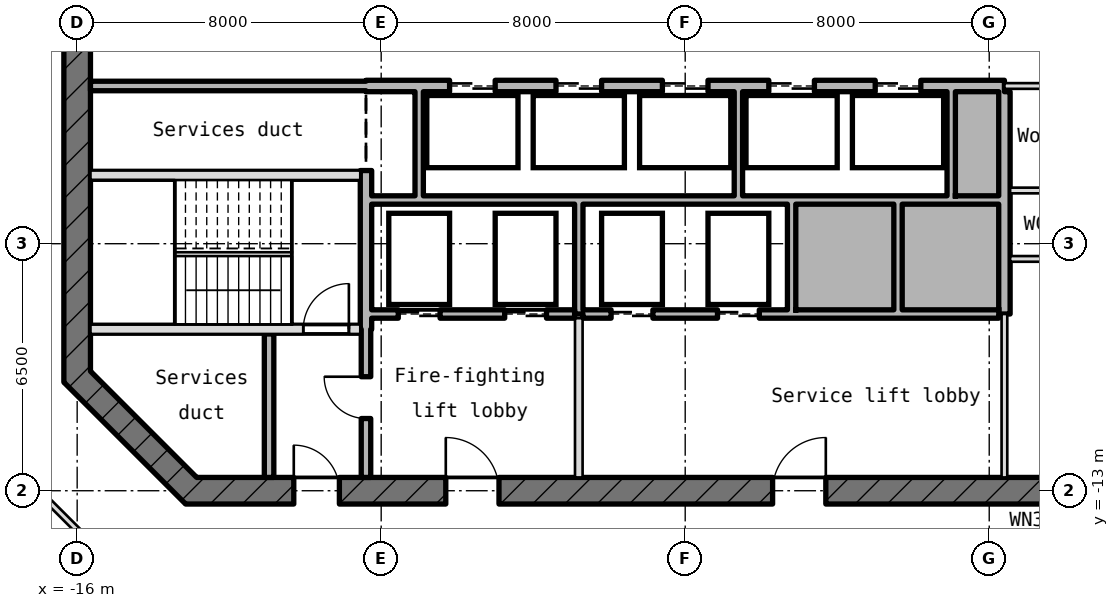
"""IFC4 building model, lengths in metres.
Left out: names, types, materials, properties, quantities, classifications, styles, units other than length and angle.
Written with IfcOpenShell. Run it as: python <this file> out.ifc"""

import sys

from ifc_helpers import new_model, si_unit, direction, frame, frame_2d, origin, place, context, subcontext, project, spatial, rectangle, extrude, element, fill, save


model = new_model("IFC4")
c1 = context("Model", 3, precision=1e-05, world=origin(), true_north=direction((0.0, 1.0)))
c2 = subcontext(c1, "Body", "Model", "MODEL_VIEW")
j1 = project(units=[si_unit("LENGTHUNIT", "METRE"), si_unit("PLANEANGLEUNIT", "RADIAN")], contexts=[c1])
p1 = place(None, origin())
s1 = spatial("IfcSite", under=j1, at=p1, CompositionType="ELEMENT")
p2 = place(p1, origin())
s2 = spatial("IfcBuilding", under=s1, at=p2, CompositionType="ELEMENT")
p3 = place(p2, frame((0.0, 0.0, 284.5)))
s3 = spatial("IfcBuildingStorey", under=s2, at=p3, CompositionType="ELEMENT", Elevation=284.5)
p4 = place(p3, frame((-16.0, 10.145, -0.18), z_axis=(0.0, 0.0, 1.0), x_axis=(0.0, -1.0, 0.0)))
e1 = element("IfcWall", 1, at=p4, inside=s3, PredefinedType="SHEAR", context=c2, shape_type="SweptSolid", body=[
    extrude(rectangle(XDim=20.29, YDim=0.7, at=frame_2d((10.145, 0.0))), origin(), (0.0, 0.0, 1.0), 4.15),
])
p5 = place(p4, frame((8.945, 0.0, 0.18)))
e2 = element("IfcOpeningElement", 2, at=p5, cuts=e1, PredefinedType="OPENING", context=c2, shape_type="SweptSolid", body=[
    extrude(rectangle(XDim=2.4, YDim=2.1, at=frame_2d((1.2, 1.05))), frame((0.0, 0.36, 0.0), z_axis=(0.0, -1.0, 0.0), x_axis=(1.0, 0.0, 0.0)), (0.0, 0.0, 1.0), 0.72),
])
p6 = place(p4, frame((5.545, 0.0, 0.18)))
e3 = element("IfcOpeningElement", 3, at=p6, cuts=e1, PredefinedType="OPENING", context=c2, shape_type="SweptSolid", body=[
    extrude(rectangle(XDim=1.2, YDim=2.1, at=frame_2d((0.6, 1.05))), frame((0.0, 0.36, 0.0), z_axis=(0.0, -1.0, 0.0), x_axis=(1.0, 0.0, 0.0)), (0.0, 0.0, 1.0), 0.72),
])
p7 = place(p3, frame((-16.103, -9.897, -0.18), z_axis=(0.0, 0.0, 1.0), x_axis=(0.707106781187, -0.707106781187, 0.0)))
e4 = element("IfcWall", 4, at=p7, inside=s3, PredefinedType="SHEAR", context=c2, shape_type="SweptSolid", body=[
    extrude(rectangle(XDim=4.533, YDim=0.7, at=frame_2d((2.266, 0.0))), origin(), (0.0, 0.0, 1.0), 4.15),
])
p8 = place(p3, frame((-13.145, -13.0, -0.18), z_axis=(0.0, 0.0, 1.0), x_axis=(1.0, 0.0, 0.0)))
e5 = element("IfcWall", 5, at=p8, inside=s3, PredefinedType="SHEAR", context=c2, shape_type="SweptSolid", body=[
    extrude(rectangle(XDim=26.29, YDim=0.7, at=frame_2d((13.145, 0.0))), origin(), (0.0, 0.0, 1.0), 4.15),
])
p9 = place(p8, frame((2.845, 0.0, 0.18)))
e6 = element("IfcOpeningElement", 6, at=p9, cuts=e5, PredefinedType="OPENING", context=c2, shape_type="SweptSolid", body=[
    extrude(rectangle(XDim=1.2, YDim=2.1, at=frame_2d((0.6, 1.05))), frame((0.0, 0.36, 0.0), z_axis=(0.0, -1.0, 0.0), x_axis=(1.0, 0.0, 0.0)), (0.0, 0.0, 1.0), 0.72),
])
p10 = place(p8, frame((6.845, 0.0, 0.18)))
e7 = element("IfcOpeningElement", 7, at=p10, cuts=e5, PredefinedType="OPENING", context=c2, shape_type="SweptSolid", body=[
    extrude(rectangle(XDim=1.4, YDim=2.1, at=frame_2d((0.7, 1.05))), frame((0.0, 0.36, 0.0), z_axis=(0.0, -1.0, 0.0), x_axis=(1.0, 0.0, 0.0)), (0.0, 0.0, 1.0), 0.72),
])
p11 = place(p8, frame((15.445, 0.0, 0.18)))
e8 = element("IfcOpeningElement", 8, at=p11, cuts=e5, PredefinedType="OPENING", context=c2, shape_type="SweptSolid", body=[
    extrude(rectangle(XDim=1.4, YDim=2.1, at=frame_2d((0.7, 1.05))), frame((0.0, 0.36, 0.0), z_axis=(0.0, -1.0, 0.0), x_axis=(1.0, 0.0, 0.0)), (0.0, 0.0, 1.0), 0.72),
])
p12 = place(p3, frame((-15.65, -8.75, -0.18), z_axis=(0.0, 0.0, 1.0), x_axis=(1.0, 0.0, 0.0)))
e9 = element("IfcWall", 9, at=p12, inside=s3, PredefinedType="SHEAR", context=c2, shape_type="SweptSolid", body=[
    extrude(rectangle(XDim=7.1, YDim=0.25, at=frame_2d((3.55, 0.0))), origin(), (0.0, 0.0, 1.0), 4.15),
])
p13 = place(p12, frame((5.6, 0.0, 0.18)))
e10 = element("IfcOpeningElement", 10, at=p13, cuts=e9, PredefinedType="OPENING", context=c2, shape_type="SweptSolid", body=[
    extrude(rectangle(XDim=1.2, YDim=2.1, at=frame_2d((0.6, 1.05))), frame((0.0, 0.135, 0.0), z_axis=(0.0, -1.0, 0.0), x_axis=(1.0, 0.0, 0.0)), (0.0, 0.0, 1.0), 0.27),
])
p14 = place(p3, frame((-8.25, -8.35, 0.0), z_axis=(0.0, 0.0, 1.0), x_axis=(1.0, 0.0, 0.0)))
e11 = element("IfcWall", 11, at=p14, inside=s3, PredefinedType="STANDARD", context=c2, shape_type="SweptSolid", body=[
    extrude(rectangle(XDim=5.34, YDim=0.22, at=frame_2d((2.67, 0.0))), origin(), (0.0, 0.0, 1.0), 3.97),
])
p15 = place(p14, frame((0.7, 0.0, 0.0)))
e12 = element("IfcOpeningElement", 12, at=p15, cuts=e11, PredefinedType="OPENING", context=c2, shape_type="SweptSolid", body=[
    extrude(rectangle(XDim=1.1, YDim=2.1, at=frame_2d((0.55, 1.05))), frame((0.0, 0.12, 0.0), z_axis=(0.0, -1.0, 0.0), x_axis=(1.0, 0.0, 0.0)), (0.0, 0.0, 1.0), 0.24),
])
p16 = place(p14, frame((3.5, 0.0, 0.0)))
e13 = element("IfcOpeningElement", 13, at=p16, cuts=e11, PredefinedType="OPENING", context=c2, shape_type="SweptSolid", body=[
    extrude(rectangle(XDim=1.1, YDim=2.1, at=frame_2d((0.55, 1.05))), frame((0.0, 0.12, 0.0), z_axis=(0.0, -1.0, 0.0), x_axis=(1.0, 0.0, 0.0)), (0.0, 0.0, 1.0), 0.24),
])
p17 = place(p3, frame((-2.69, -8.35, 0.0), z_axis=(0.0, 0.0, 1.0), x_axis=(1.0, 0.0, 0.0)))
e14 = element("IfcWall", 14, at=p17, inside=s3, PredefinedType="STANDARD", context=c2, shape_type="SweptSolid", body=[
    extrude(rectangle(XDim=10.94, YDim=0.22, at=frame_2d((5.47, 0.0))), origin(), (0.0, 0.0, 1.0), 3.97),
])
p18 = place(p17, frame((0.74, 0.0, 0.0)))
e15 = element("IfcOpeningElement", 15, at=p18, cuts=e14, PredefinedType="OPENING", context=c2, shape_type="SweptSolid", body=[
    extrude(rectangle(XDim=1.1, YDim=2.1, at=frame_2d((0.55, 1.05))), frame((0.0, 0.12, 0.0), z_axis=(0.0, -1.0, 0.0), x_axis=(1.0, 0.0, 0.0)), (0.0, 0.0, 1.0), 0.24),
])
p19 = place(p17, frame((3.54, 0.0, 0.0)))
e16 = element("IfcOpeningElement", 16, at=p19, cuts=e14, PredefinedType="OPENING", context=c2, shape_type="SweptSolid", body=[
    extrude(rectangle(XDim=1.1, YDim=2.1, at=frame_2d((0.55, 1.05))), frame((0.0, 0.12, 0.0), z_axis=(0.0, -1.0, 0.0), x_axis=(1.0, 0.0, 0.0)), (0.0, 0.0, 1.0), 0.24),
])
p20 = place(p3, frame((8.55, -6.9, 0.0), z_axis=(0.0, 0.0, 1.0), x_axis=(1.0, 0.0, 0.0)))
e17 = element("IfcWall", 17, at=p20, inside=s3, PredefinedType="PARTITIONING", context=c2, shape_type="SweptSolid", body=[
    extrude(rectangle(XDim=7.1, YDim=0.15, at=frame_2d((3.55, 0.0))), origin(), (0.0, 0.0, 1.0), 3.97),
])
p21 = place(p20, frame((2.975, 0.0, 0.0)))
e18 = element("IfcOpeningElement", 18, at=p21, cuts=e17, PredefinedType="OPENING", context=c2, shape_type="SweptSolid", body=[
    extrude(rectangle(XDim=1.0, YDim=2.1, at=frame_2d((0.5, 1.05))), frame((0.0, 0.085, 0.0), z_axis=(0.0, -1.0, 0.0), x_axis=(1.0, 0.0, 0.0)), (0.0, 0.0, 1.0), 0.17),
])
p22 = place(p3, frame((-8.25, -5.35, 0.0), z_axis=(0.0, 0.0, 1.0), x_axis=(1.0, 0.0, 0.0)))
e19 = element("IfcWall", 19, at=p22, inside=s3, PredefinedType="STANDARD", context=c2, shape_type="SweptSolid", body=[
    extrude(rectangle(XDim=16.5, YDim=0.22, at=frame_2d((8.25, 0.0))), origin(), (0.0, 0.0, 1.0), 3.97),
])
p23 = place(p3, frame((8.55, -5.1, 0.0), z_axis=(0.0, 0.0, 1.0), x_axis=(1.0, 0.0, 0.0)))
e20 = element("IfcWall", 20, at=p23, inside=s3, PredefinedType="PARTITIONING", context=c2, shape_type="SweptSolid", body=[
    extrude(rectangle(XDim=7.1, YDim=0.15, at=frame_2d((3.55, 0.0))), origin(), (0.0, 0.0, 1.0), 3.97),
])
p24 = place(p23, frame((2.975, 0.0, 0.0)))
e21 = element("IfcOpeningElement", 21, at=p24, cuts=e20, PredefinedType="OPENING", context=c2, shape_type="SweptSolid", body=[
    extrude(rectangle(XDim=1.0, YDim=2.1, at=frame_2d((0.5, 1.05))), frame((0.0, 0.085, 0.0), z_axis=(0.0, -1.0, 0.0), x_axis=(1.0, 0.0, 0.0)), (0.0, 0.0, 1.0), 0.17),
])
p25 = place(p3, frame((-15.65, -4.7, -0.18), z_axis=(0.0, 0.0, 1.0), x_axis=(1.0, 0.0, 0.0)))
e22 = element("IfcWall", 22, at=p25, inside=s3, PredefinedType="SHEAR", context=c2, shape_type="SweptSolid", body=[
    extrude(rectangle(XDim=7.1, YDim=0.25, at=frame_2d((3.55, 0.0))), origin(), (0.0, 0.0, 1.0), 4.15),
])
p26 = place(p3, frame((-15.65, -2.35, 0.0), z_axis=(0.0, 0.0, 1.0), x_axis=(1.0, 0.0, 0.0)))
e23 = element("IfcWall", 23, at=p26, inside=s3, PredefinedType="STANDARD", context=c2, shape_type="SweptSolid", body=[
    extrude(rectangle(XDim=7.25, YDim=0.25, at=frame_2d((3.625, 0.0))), origin(), (0.0, 0.0, 1.0), 3.97),
])
p27 = place(p3, frame((-8.4, -2.35, -0.18), z_axis=(0.0, 0.0, 1.0), x_axis=(1.0, 0.0, 0.0)))
e24 = element("IfcWall", 24, at=p27, inside=s3, PredefinedType="SHEAR", context=c2, shape_type="SweptSolid", body=[
    extrude(rectangle(XDim=16.8, YDim=0.3, at=frame_2d((8.4, 0.0))), origin(), (0.0, 0.0, 1.0), 4.15),
])
p28 = place(p27, frame((2.2, 0.0, 0.18)))
e25 = element("IfcOpeningElement", 25, at=p28, cuts=e24, PredefinedType="OPENING", context=c2, shape_type="SweptSolid", body=[
    extrude(rectangle(XDim=1.2, YDim=2.1, at=frame_2d((0.6, 1.05))), frame((0.0, 0.16, 0.0), z_axis=(0.0, -1.0, 0.0), x_axis=(1.0, 0.0, 0.0)), (0.0, 0.0, 1.0), 0.32),
])
p29 = place(p27, frame((5.0, 0.0, 0.18)))
e26 = element("IfcOpeningElement", 26, at=p29, cuts=e24, PredefinedType="OPENING", context=c2, shape_type="SweptSolid", body=[
    extrude(rectangle(XDim=1.2, YDim=2.1, at=frame_2d((0.6, 1.05))), frame((0.0, 0.16, 0.0), z_axis=(0.0, -1.0, 0.0), x_axis=(1.0, 0.0, 0.0)), (0.0, 0.0, 1.0), 0.32),
])
p30 = place(p27, frame((7.8, 0.0, 0.18)))
e27 = element("IfcOpeningElement", 27, at=p30, cuts=e24, PredefinedType="OPENING", context=c2, shape_type="SweptSolid", body=[
    extrude(rectangle(XDim=1.2, YDim=2.1, at=frame_2d((0.6, 1.05))), frame((0.0, 0.16, 0.0), z_axis=(0.0, -1.0, 0.0), x_axis=(1.0, 0.0, 0.0)), (0.0, 0.0, 1.0), 0.32),
])
p31 = place(p27, frame((10.6, 0.0, 0.18)))
e28 = element("IfcOpeningElement", 28, at=p31, cuts=e24, PredefinedType="OPENING", context=c2, shape_type="SweptSolid", body=[
    extrude(rectangle(XDim=1.2, YDim=2.1, at=frame_2d((0.6, 1.05))), frame((0.0, 0.16, 0.0), z_axis=(0.0, -1.0, 0.0), x_axis=(1.0, 0.0, 0.0)), (0.0, 0.0, 1.0), 0.32),
])
p32 = place(p27, frame((13.4, 0.0, 0.18)))
e29 = element("IfcOpeningElement", 29, at=p32, cuts=e24, PredefinedType="OPENING", context=c2, shape_type="SweptSolid", body=[
    extrude(rectangle(XDim=1.2, YDim=2.1, at=frame_2d((0.6, 1.05))), frame((0.0, 0.16, 0.0), z_axis=(0.0, -1.0, 0.0), x_axis=(1.0, 0.0, 0.0)), (0.0, 0.0, 1.0), 0.32),
])
p33 = place(p3, frame((8.4, -2.35, 0.0), z_axis=(0.0, 0.0, 1.0), x_axis=(1.0, 0.0, 0.0)))
e30 = element("IfcWall", 30, at=p33, inside=s3, PredefinedType="PARTITIONING", context=c2, shape_type="SweptSolid", body=[
    extrude(rectangle(XDim=7.25, YDim=0.15, at=frame_2d((3.625, 0.0))), origin(), (0.0, 0.0, 1.0), 3.97),
])
p34 = place(p3, frame((-10.95, -12.65, 0.0), z_axis=(0.0, 0.0, 1.0), x_axis=(0.0, 1.0, 0.0)))
e31 = element("IfcWall", 31, at=p34, inside=s3, PredefinedType="STANDARD", context=c2, shape_type="SweptSolid", body=[
    extrude(rectangle(XDim=3.775, YDim=0.25, at=frame_2d((1.887, 0.0))), origin(), (0.0, 0.0, 1.0), 3.97),
])
p35 = place(p3, frame((-8.4, -12.65, 0.0), z_axis=(0.0, 0.0, 1.0), x_axis=(0.0, 1.0, 0.0)))
e32 = element("IfcWall", 32, at=p35, inside=s3, PredefinedType="STANDARD", context=c2, shape_type="SweptSolid", body=[
    extrude(rectangle(XDim=3.9, YDim=0.25, at=frame_2d((1.95, 0.0))), origin(), (0.0, 0.0, 1.0), 3.97),
])
p36 = place(p35, frame((1.55, 0.0, 0.0)))
e33 = element("IfcOpeningElement", 33, at=p36, cuts=e32, PredefinedType="OPENING", context=c2, shape_type="SweptSolid", body=[
    extrude(rectangle(XDim=1.1, YDim=2.1, at=frame_2d((0.55, 1.05))), frame((0.0, 0.135, 0.0), z_axis=(0.0, -1.0, 0.0), x_axis=(1.0, 0.0, 0.0)), (0.0, 0.0, 1.0), 0.27),
])
p37 = place(p3, frame((-8.4, -8.75, -0.18), z_axis=(0.0, 0.0, 1.0), x_axis=(0.0, 1.0, 0.0)))
e34 = element("IfcWall", 34, at=p37, inside=s3, PredefinedType="SHEAR", context=c2, shape_type="SweptSolid", body=[
    extrude(rectangle(XDim=4.175, YDim=0.3, at=frame_2d((2.087, 0.0))), origin(), (0.0, 0.0, 1.0), 4.15),
])
p38 = place(p3, frame((-7.0, -5.24, 0.0), z_axis=(0.0, 0.0, 1.0), x_axis=(0.0, 1.0, 0.0)))
e35 = element("IfcWall", 35, at=p38, inside=s3, PredefinedType="STANDARD", context=c2, shape_type="SweptSolid", body=[
    extrude(rectangle(XDim=2.74, YDim=0.22, at=frame_2d((1.37, 0.0))), origin(), (0.0, 0.0, 1.0), 3.97),
])
p39 = place(p3, frame((-2.8, -12.65, 0.0), z_axis=(0.0, 0.0, 1.0), x_axis=(0.0, 1.0, 0.0)))
e36 = element("IfcWall", 36, at=p39, inside=s3, PredefinedType="PARTITIONING", context=c2, shape_type="SweptSolid", body=[
    extrude(rectangle(XDim=4.19, YDim=0.2, at=frame_2d((2.095, 0.0))), origin(), (0.0, 0.0, 1.0), 3.97),
])
p40 = place(p3, frame((-2.8, -8.35, 0.0), z_axis=(0.0, 0.0, 1.0), x_axis=(0.0, 1.0, 0.0)))
e37 = element("IfcWall", 37, at=p40, inside=s3, PredefinedType="STANDARD", context=c2, shape_type="SweptSolid", body=[
    extrude(rectangle(XDim=2.89, YDim=0.22, at=frame_2d((1.445, 0.0))), origin(), (0.0, 0.0, 1.0), 3.97),
])
p41 = place(p3, frame((1.4, -5.24, 0.0), z_axis=(0.0, 0.0, 1.0), x_axis=(0.0, 1.0, 0.0)))
e38 = element("IfcWall", 38, at=p41, inside=s3, PredefinedType="STANDARD", context=c2, shape_type="SweptSolid", body=[
    extrude(rectangle(XDim=2.74, YDim=0.22, at=frame_2d((1.37, 0.0))), origin(), (0.0, 0.0, 1.0), 3.97),
])
for number, where, z_axis, x_axis in (
    (39, (2.8, -8.24, 0.0), (0.0, 0.0, 1.0), (0.0, 1.0, 0.0)),
    (40, (5.6, -8.24, 0.0), (0.0, 0.0, 1.0), (0.0, 1.0, 0.0)),
):
    element("IfcWall", number, at=place(p3, frame(where, z_axis=z_axis, x_axis=x_axis)), inside=s3, PredefinedType="STANDARD", context=c2, shape_type="SweptSolid", body=[
        extrude(rectangle(XDim=2.78, YDim=0.22, at=frame_2d((1.39, 0.0))), origin(), (0.0, 0.0, 1.0), 3.97),
    ])
p42 = place(p3, frame((7.0, -5.24, 0.0), z_axis=(0.0, 0.0, 1.0), x_axis=(0.0, 1.0, 0.0)))
e41 = element("IfcWall", 41, at=p42, inside=s3, PredefinedType="STANDARD", context=c2, shape_type="SweptSolid", body=[
    extrude(rectangle(XDim=2.74, YDim=0.22, at=frame_2d((1.37, 0.0))), origin(), (0.0, 0.0, 1.0), 3.97),
])
p43 = place(p3, frame((8.4, -12.65, 0.0), z_axis=(0.0, 0.0, 1.0), x_axis=(0.0, 1.0, 0.0)))
e42 = element("IfcWall", 42, at=p43, inside=s3, PredefinedType="PARTITIONING", context=c2, shape_type="SweptSolid", body=[
    extrude(rectangle(XDim=4.3, YDim=0.15, at=frame_2d((2.15, 0.0))), origin(), (0.0, 0.0, 1.0), 3.97),
])
p44 = place(p3, frame((8.4, -8.35, -0.18), z_axis=(0.0, 0.0, 1.0), x_axis=(0.0, 1.0, 0.0)))
e43 = element("IfcWall", 43, at=p44, inside=s3, PredefinedType="SHEAR", context=c2, shape_type="SweptSolid", body=[
    extrude(rectangle(XDim=5.85, YDim=0.3, at=frame_2d((2.925, 0.0))), origin(), (0.0, 0.0, 1.0), 4.15),
])
p45 = place(p3, frame((-14.18, -15.85, 0.0), z_axis=(0.0, 0.0, 1.0), x_axis=(-0.707106781187, 0.707106781187, 0.0)))
e44 = element("IfcWall", 44, at=p45, inside=s3, PredefinedType="PARTITIONING", context=c2, shape_type="SweptSolid", body=[
    extrude(rectangle(XDim=6.604, YDim=0.15, at=frame_2d((3.302, 0.0))), origin(), (0.0, 0.0, 1.0), 3.97),
])
p46 = place(p28, origin())
e45 = element("IfcDoor", 45, at=p46, inside=s3, OperationType="DOUBLE_DOOR_SLIDING", PredefinedType="DOOR", context=c2, shape_type="SweptSolid", body=[
    extrude(rectangle(XDim=1.2, YDim=2.1, at=frame_2d((0.6, 1.05))), frame((0.0, 0.025, 0.0), z_axis=(0.0, -1.0, 0.0), x_axis=(1.0, 0.0, 0.0)), (0.0, 0.0, 1.0), 0.05),
])
fill(e25, e45)
p47 = place(p29, origin())
e46 = element("IfcDoor", 46, at=p47, inside=s3, OperationType="DOUBLE_DOOR_SLIDING", PredefinedType="DOOR", context=c2, shape_type="SweptSolid", body=[
    extrude(rectangle(XDim=1.2, YDim=2.1, at=frame_2d((0.6, 1.05))), frame((0.0, 0.025, 0.0), z_axis=(0.0, -1.0, 0.0), x_axis=(1.0, 0.0, 0.0)), (0.0, 0.0, 1.0), 0.05),
])
fill(e26, e46)
p48 = place(p30, origin())
e47 = element("IfcDoor", 47, at=p48, inside=s3, OperationType="DOUBLE_DOOR_SLIDING", PredefinedType="DOOR", context=c2, shape_type="SweptSolid", body=[
    extrude(rectangle(XDim=1.2, YDim=2.1, at=frame_2d((0.6, 1.05))), frame((0.0, 0.025, 0.0), z_axis=(0.0, -1.0, 0.0), x_axis=(1.0, 0.0, 0.0)), (0.0, 0.0, 1.0), 0.05),
])
fill(e27, e47)
p49 = place(p31, origin())
e48 = element("IfcDoor", 48, at=p49, inside=s3, OperationType="DOUBLE_DOOR_SLIDING", PredefinedType="DOOR", context=c2, shape_type="SweptSolid", body=[
    extrude(rectangle(XDim=1.2, YDim=2.1, at=frame_2d((0.6, 1.05))), frame((0.0, 0.025, 0.0), z_axis=(0.0, -1.0, 0.0), x_axis=(1.0, 0.0, 0.0)), (0.0, 0.0, 1.0), 0.05),
])
fill(e28, e48)
p50 = place(p32, origin())
e49 = element("IfcDoor", 49, at=p50, inside=s3, OperationType="DOUBLE_DOOR_SLIDING", PredefinedType="DOOR", context=c2, shape_type="SweptSolid", body=[
    extrude(rectangle(XDim=1.2, YDim=2.1, at=frame_2d((0.6, 1.05))), frame((0.0, 0.025, 0.0), z_axis=(0.0, -1.0, 0.0), x_axis=(1.0, 0.0, 0.0)), (0.0, 0.0, 1.0), 0.05),
])
fill(e29, e49)
p51 = place(p15, origin())
e50 = element("IfcDoor", 50, at=p51, inside=s3, OperationType="DOUBLE_DOOR_SLIDING", PredefinedType="DOOR", context=c2, shape_type="SweptSolid", body=[
    extrude(rectangle(XDim=1.1, YDim=2.1, at=frame_2d((0.55, 1.05))), frame((0.0, 0.025, 0.0), z_axis=(0.0, -1.0, 0.0), x_axis=(1.0, 0.0, 0.0)), (0.0, 0.0, 1.0), 0.05),
])
fill(e12, e50)
p52 = place(p16, origin())
e51 = element("IfcDoor", 51, at=p52, inside=s3, OperationType="DOUBLE_DOOR_SLIDING", PredefinedType="DOOR", context=c2, shape_type="SweptSolid", body=[
    extrude(rectangle(XDim=1.1, YDim=2.1, at=frame_2d((0.55, 1.05))), frame((0.0, 0.025, 0.0), z_axis=(0.0, -1.0, 0.0), x_axis=(1.0, 0.0, 0.0)), (0.0, 0.0, 1.0), 0.05),
])
fill(e13, e51)
p53 = place(p18, origin())
e52 = element("IfcDoor", 52, at=p53, inside=s3, OperationType="DOUBLE_DOOR_SLIDING", PredefinedType="DOOR", context=c2, shape_type="SweptSolid", body=[
    extrude(rectangle(XDim=1.1, YDim=2.1, at=frame_2d((0.55, 1.05))), frame((0.0, 0.025, 0.0), z_axis=(0.0, -1.0, 0.0), x_axis=(1.0, 0.0, 0.0)), (0.0, 0.0, 1.0), 0.05),
])
fill(e15, e52)
p54 = place(p19, origin())
e53 = element("IfcDoor", 53, at=p54, inside=s3, OperationType="DOUBLE_DOOR_SLIDING", PredefinedType="DOOR", context=c2, shape_type="SweptSolid", body=[
    extrude(rectangle(XDim=1.1, YDim=2.1, at=frame_2d((0.55, 1.05))), frame((0.0, 0.025, 0.0), z_axis=(0.0, -1.0, 0.0), x_axis=(1.0, 0.0, 0.0)), (0.0, 0.0, 1.0), 0.05),
])
fill(e16, e53)
p55 = place(p13, origin())
e54 = element("IfcDoor", 54, at=p55, inside=s3, OperationType="SINGLE_SWING_RIGHT", PredefinedType="DOOR", context=c2, shape_type="SweptSolid", body=[
    extrude(rectangle(XDim=1.2, YDim=2.1, at=frame_2d((0.6, 1.05))), frame((0.0, 0.025, 0.0), z_axis=(0.0, -1.0, 0.0), x_axis=(1.0, 0.0, 0.0)), (0.0, 0.0, 1.0), 0.05),
])
fill(e10, e54)
p56 = place(p36, origin())
e55 = element("IfcDoor", 55, at=p56, inside=s3, OperationType="SINGLE_SWING_RIGHT", PredefinedType="DOOR", context=c2, shape_type="SweptSolid", body=[
    extrude(rectangle(XDim=1.1, YDim=2.1, at=frame_2d((0.55, 1.05))), frame((0.0, 0.025, 0.0), z_axis=(0.0, -1.0, 0.0), x_axis=(1.0, 0.0, 0.0)), (0.0, 0.0, 1.0), 0.05),
])
fill(e33, e55)
p57 = place(p9, origin())
e56 = element("IfcDoor", 56, at=p57, inside=s3, OperationType="SINGLE_SWING_RIGHT", PredefinedType="DOOR", context=c2, shape_type="SweptSolid", body=[
    extrude(rectangle(XDim=1.2, YDim=2.1, at=frame_2d((0.6, 1.05))), frame((0.0, 0.025, 0.0), z_axis=(0.0, -1.0, 0.0), x_axis=(1.0, 0.0, 0.0)), (0.0, 0.0, 1.0), 0.05),
])
fill(e6, e56)
p58 = place(p10, origin())
e57 = element("IfcDoor", 57, at=p58, inside=s3, OperationType="SINGLE_SWING_RIGHT", PredefinedType="DOOR", context=c2, shape_type="SweptSolid", body=[
    extrude(rectangle(XDim=1.4, YDim=2.1, at=frame_2d((0.7, 1.05))), frame((0.0, 0.025, 0.0), z_axis=(0.0, -1.0, 0.0), x_axis=(1.0, 0.0, 0.0)), (0.0, 0.0, 1.0), 0.05),
])
fill(e7, e57)
p59 = place(p11, origin())
e58 = element("IfcDoor", 58, at=p59, inside=s3, OperationType="SINGLE_SWING_RIGHT", PredefinedType="DOOR", context=c2, shape_type="SweptSolid", body=[
    extrude(rectangle(XDim=1.4, YDim=2.1, at=frame_2d((0.7, 1.05))), frame((0.0, 0.025, 0.0), z_axis=(0.0, -1.0, 0.0), x_axis=(1.0, 0.0, 0.0)), (0.0, 0.0, 1.0), 0.05),
])
fill(e8, e58)
save(model, sys.argv[1])
